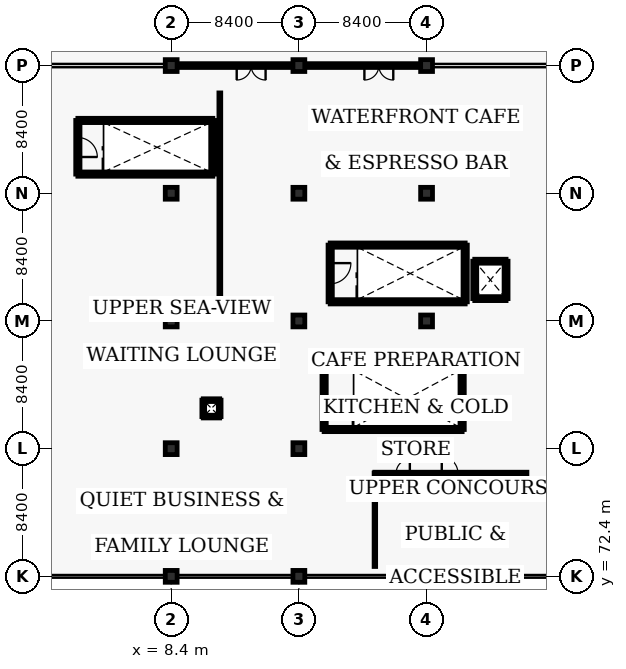
"""IFC4 building model, lengths in metres.
Left out: names, types, materials, properties, quantities, classifications, styles, units other than length and angle.
Written with IfcOpenShell. Run it as: python <this file> out.ifc"""

import sys

from ifc_helpers import new_model, si_unit, direction, frame, frame_2d, origin, origin_2d, place, context, subcontext, project, spatial, rectangle, circle, extrude, element, fill, save


model = new_model("IFC4")
c1 = context("Model", 3, precision=1e-05, world=origin(), true_north=direction((0.0, 1.0)))
c2 = subcontext(c1, "Body", "Model", "MODEL_VIEW")
j1 = project(units=[si_unit("LENGTHUNIT", "METRE"), si_unit("PLANEANGLEUNIT", "RADIAN")], contexts=[c1])
p1 = place(None, origin())
s1 = spatial("IfcSite", under=j1, at=p1, CompositionType="ELEMENT")
p2 = place(p1, origin())
s2 = spatial("IfcBuilding", under=s1, at=p2, CompositionType="ELEMENT")
p3 = place(p2, frame((0.0, 0.0, 9.6)))
s3 = spatial("IfcBuildingStorey", under=s2, at=p3, CompositionType="ELEMENT", Elevation=9.6)
p4 = place(p3, frame((8.4, 72.4, 0.0), z_axis=(0.0, 0.0, 1.0), x_axis=(1.0, 0.0, 0.0)))
e1 = element("IfcColumn", 1, at=p4, inside=s3, PredefinedType="COLUMN", context=c2, shape_type="SweptSolid", body=[
    extrude(circle(Radius=0.39, at=origin_2d()), origin(), (0.0, 0.0, 1.0), 5.565),
])
p5 = place(p3, frame((8.4, 80.8, 0.0), z_axis=(0.0, 0.0, 1.0), x_axis=(1.0, 0.0, 0.0)))
e2 = element("IfcColumn", 2, at=p5, inside=s3, PredefinedType="COLUMN", context=c2, shape_type="SweptSolid", body=[
    extrude(circle(Radius=0.39, at=origin_2d()), origin(), (0.0, 0.0, 1.0), 6.279),
])
p6 = place(p3, frame((8.4, 89.2, 0.0), z_axis=(0.0, 0.0, 1.0), x_axis=(1.0, 0.0, 0.0)))
e3 = element("IfcColumn", 3, at=p6, inside=s3, PredefinedType="COLUMN", context=c2, shape_type="SweptSolid", body=[
    extrude(circle(Radius=0.39, at=origin_2d()), origin(), (0.0, 0.0, 1.0), 6.993),
])
p7 = place(p3, frame((8.4, 97.6, 0.0), z_axis=(0.0, 0.0, 1.0), x_axis=(1.0, 0.0, 0.0)))
e4 = element("IfcColumn", 4, at=p7, inside=s3, PredefinedType="COLUMN", context=c2, shape_type="SweptSolid", body=[
    extrude(circle(Radius=0.39, at=origin_2d()), origin(), (0.0, 0.0, 1.0), 7.708),
])
p8 = place(p3, frame((8.4, 106.0, 0.0), z_axis=(0.0, 0.0, 1.0), x_axis=(1.0, 0.0, 0.0)))
e5 = element("IfcColumn", 5, at=p8, inside=s3, PredefinedType="COLUMN", context=c2, shape_type="SweptSolid", body=[
    extrude(circle(Radius=0.39, at=origin_2d()), origin(), (0.0, 0.0, 1.0), 8.422),
])
p9 = place(p3, frame((16.8, 72.4, 0.0), z_axis=(0.0, 0.0, 1.0), x_axis=(1.0, 0.0, 0.0)))
e6 = element("IfcColumn", 6, at=p9, inside=s3, PredefinedType="COLUMN", context=c2, shape_type="SweptSolid", body=[
    extrude(circle(Radius=0.39, at=origin_2d()), origin(), (0.0, 0.0, 1.0), 8.043),
])
p10 = place(p3, frame((16.8, 80.8, 0.0), z_axis=(0.0, 0.0, 1.0), x_axis=(1.0, 0.0, 0.0)))
e7 = element("IfcColumn", 7, at=p10, inside=s3, PredefinedType="COLUMN", context=c2, shape_type="SweptSolid", body=[
    extrude(circle(Radius=0.39, at=origin_2d()), origin(), (0.0, 0.0, 1.0), 8.757),
])
p11 = place(p3, frame((16.8, 89.2, 0.0), z_axis=(0.0, 0.0, 1.0), x_axis=(1.0, 0.0, 0.0)))
e8 = element("IfcColumn", 8, at=p11, inside=s3, PredefinedType="COLUMN", context=c2, shape_type="SweptSolid", body=[
    extrude(circle(Radius=0.39, at=origin_2d()), origin(), (0.0, 0.0, 1.0), 9.471),
])
p12 = place(p3, frame((16.8, 97.6, 0.0), z_axis=(0.0, 0.0, 1.0), x_axis=(1.0, 0.0, 0.0)))
e9 = element("IfcColumn", 9, at=p12, inside=s3, PredefinedType="COLUMN", context=c2, shape_type="SweptSolid", body=[
    extrude(circle(Radius=0.39, at=origin_2d()), origin(), (0.0, 0.0, 1.0), 10.186),
])
p13 = place(p3, frame((16.8, 106.0, 0.0), z_axis=(0.0, 0.0, 1.0), x_axis=(1.0, 0.0, 0.0)))
e10 = element("IfcColumn", 10, at=p13, inside=s3, PredefinedType="COLUMN", context=c2, shape_type="SweptSolid", body=[
    extrude(circle(Radius=0.39, at=origin_2d()), origin(), (0.0, 0.0, 1.0), 10.9),
])
p14 = place(p3, frame((25.2, 72.4, 0.0), z_axis=(0.0, 0.0, 1.0), x_axis=(1.0, 0.0, 0.0)))
e11 = element("IfcColumn", 11, at=p14, inside=s3, PredefinedType="COLUMN", context=c2, shape_type="SweptSolid", body=[
    extrude(circle(Radius=0.39, at=origin_2d()), origin(), (0.0, 0.0, 1.0), 5.565),
])
p15 = place(p3, frame((25.2, 80.8, 0.0), z_axis=(0.0, 0.0, 1.0), x_axis=(1.0, 0.0, 0.0)))
e12 = element("IfcColumn", 12, at=p15, inside=s3, PredefinedType="COLUMN", context=c2, shape_type="SweptSolid", body=[
    extrude(circle(Radius=0.39, at=origin_2d()), origin(), (0.0, 0.0, 1.0), 6.279),
])
p16 = place(p3, frame((25.2, 89.2, 0.0), z_axis=(0.0, 0.0, 1.0), x_axis=(1.0, 0.0, 0.0)))
e13 = element("IfcColumn", 13, at=p16, inside=s3, PredefinedType="COLUMN", context=c2, shape_type="SweptSolid", body=[
    extrude(circle(Radius=0.39, at=origin_2d()), origin(), (0.0, 0.0, 1.0), 6.993),
])
p17 = place(p3, frame((25.2, 97.6, 0.0), z_axis=(0.0, 0.0, 1.0), x_axis=(1.0, 0.0, 0.0)))
e14 = element("IfcColumn", 14, at=p17, inside=s3, PredefinedType="COLUMN", context=c2, shape_type="SweptSolid", body=[
    extrude(circle(Radius=0.39, at=origin_2d()), origin(), (0.0, 0.0, 1.0), 7.708),
])
p18 = place(p3, frame((25.2, 106.0, 0.0), z_axis=(0.0, 0.0, 1.0), x_axis=(1.0, 0.0, 0.0)))
e15 = element("IfcColumn", 15, at=p18, inside=s3, PredefinedType="COLUMN", context=c2, shape_type="SweptSolid", body=[
    extrude(circle(Radius=0.39, at=origin_2d()), origin(), (0.0, 0.0, 1.0), 8.422),
])
p19 = place(p3, frame((16.41, 106.0, 0.0), z_axis=(0.0, 0.0, 1.0), x_axis=(-1.0, 0.0, 0.0)))
e16 = element("IfcWall", 16, at=p19, inside=s3, PredefinedType="SOLIDWALL", context=c2, shape_type="SweptSolid", body=[
    extrude(rectangle(XDim=7.62, YDim=0.25, at=frame_2d((3.81, 0.0))), origin(), (0.0, 0.0, 1.0), 5.243),
])
p20 = place(p19, frame((1.8, 0.0, 0.0)))
e17 = element("IfcOpeningElement", 17, at=p20, cuts=e16, PredefinedType="OPENING", context=c2, shape_type="SweptSolid", body=[
    extrude(rectangle(XDim=1.9, YDim=2.15, at=frame_2d((0.95, 1.075))), frame((0.0, 0.135, 0.0), z_axis=(0.0, -1.0, 0.0), x_axis=(1.0, 0.0, 0.0)), (0.0, 0.0, 1.0), 0.27),
])
p21 = place(p19, frame((4.45, 0.0, 0.9)))
e18 = element("IfcOpeningElement", 18, at=p21, cuts=e16, PredefinedType="OPENING", context=c2, shape_type="SweptSolid", body=[
    extrude(rectangle(XDim=2.1, YDim=1.6, at=frame_2d((1.05, 0.8))), frame((0.0, 0.135, 0.0), z_axis=(0.0, -1.0, 0.0), x_axis=(1.0, 0.0, 0.0)), (0.0, 0.0, 1.0), 0.27),
])
p22 = place(p3, frame((24.81, 106.0, 0.0), z_axis=(0.0, 0.0, 1.0), x_axis=(-1.0, 0.0, 0.0)))
e19 = element("IfcWall", 19, at=p22, inside=s3, PredefinedType="SOLIDWALL", context=c2, shape_type="SweptSolid", body=[
    extrude(rectangle(XDim=7.62, YDim=0.25, at=frame_2d((3.81, 0.0))), origin(), (0.0, 0.0, 1.0), 5.243),
])
p23 = place(p22, frame((1.8, 0.0, 0.0)))
e20 = element("IfcOpeningElement", 20, at=p23, cuts=e19, PredefinedType="OPENING", context=c2, shape_type="SweptSolid", body=[
    extrude(rectangle(XDim=1.9, YDim=2.15, at=frame_2d((0.95, 1.075))), frame((0.0, 0.135, 0.0), z_axis=(0.0, -1.0, 0.0), x_axis=(1.0, 0.0, 0.0)), (0.0, 0.0, 1.0), 0.27),
])
p24 = place(p22, frame((4.45, 0.0, 0.9)))
e21 = element("IfcOpeningElement", 21, at=p24, cuts=e19, PredefinedType="OPENING", context=c2, shape_type="SweptSolid", body=[
    extrude(rectangle(XDim=1.7, YDim=1.6, at=frame_2d((0.85, 0.8))), frame((0.0, 0.135, 0.0), z_axis=(0.0, -1.0, 0.0), x_axis=(1.0, 0.0, 0.0)), (0.0, 0.0, 1.0), 0.27),
])
for number, where, z_axis, x_axis in (
    (22, (18.86, 90.46, 0.0), (0.0, 0.0, 1.0), (1.0, 0.0, 0.0)),
    (23, (18.86, 94.19, 0.0), (0.0, 0.0, 1.0), (1.0, 0.0, 0.0)),
):
    element("IfcWall", number, at=place(p3, frame(where, z_axis=z_axis, x_axis=x_axis)), inside=s3, PredefinedType="SHEAR", context=c2, shape_type="SweptSolid", body=[
        extrude(rectangle(XDim=8.88, YDim=0.28, at=frame_2d((4.44, 0.0))), origin(), (0.0, 0.0, 1.0), 2.75),
    ])
p25 = place(p3, frame((18.86, 94.19, 0.0), z_axis=(0.0, 0.0, 1.0), x_axis=(0.0, -1.0, 0.0)))
e24 = element("IfcWall", 24, at=p25, inside=s3, PredefinedType="SHEAR", context=c2, shape_type="SweptSolid", body=[
    extrude(rectangle(XDim=3.73, YDim=0.28, at=frame_2d((1.865, 0.0))), origin(), (0.0, 0.0, 1.0), 2.75),
])
p26 = place(p25, frame((1.185, 0.0, 0.0)))
e25 = element("IfcOpeningElement", 25, at=p26, cuts=e24, PredefinedType="OPENING", context=c2, shape_type="SweptSolid", body=[
    extrude(rectangle(XDim=1.36, YDim=2.15, at=frame_2d((0.68, 1.075))), frame((0.0, 0.15, 0.0), z_axis=(0.0, -1.0, 0.0), x_axis=(1.0, 0.0, 0.0)), (0.0, 0.0, 1.0), 0.3),
])
p27 = place(p3, frame((27.74, 90.46, 0.0), z_axis=(0.0, 0.0, 1.0), x_axis=(0.0, 1.0, 0.0)))
e26 = element("IfcWall", 26, at=p27, inside=s3, PredefinedType="SHEAR", context=c2, shape_type="SweptSolid", body=[
    extrude(rectangle(XDim=3.73, YDim=0.28, at=frame_2d((1.865, 0.0))), origin(), (0.0, 0.0, 1.0), 2.75),
])
p28 = place(p3, frame((28.37, 90.67, 0.0), z_axis=(0.0, 0.0, 1.0), x_axis=(1.0, 0.0, 0.0)))
e27 = element("IfcWall", 27, at=p28, inside=s3, PredefinedType="SHEAR", context=c2, shape_type="SweptSolid", body=[
    extrude(rectangle(XDim=2.06, YDim=0.26, at=frame_2d((1.03, 0.0))), origin(), (0.0, 0.0, 1.0), 2.75),
])
for number, where, z_axis, x_axis in (
    (28, (30.43, 90.67, 0.0), (0.0, 0.0, 1.0), (0.0, 1.0, 0.0)),
    (29, (28.37, 93.13, 0.0), (0.0, 0.0, 1.0), (0.0, -1.0, 0.0)),
):
    element("IfcWall", number, at=place(p3, frame(where, z_axis=z_axis, x_axis=x_axis)), inside=s3, PredefinedType="SHEAR", context=c2, shape_type="SweptSolid", body=[
        extrude(rectangle(XDim=2.46, YDim=0.26, at=frame_2d((1.23, 0.0))), origin(), (0.0, 0.0, 1.0), 2.75),
    ])
p29 = place(p3, frame((28.37, 93.13, 0.0), z_axis=(0.0, 0.0, 1.0), x_axis=(1.0, 0.0, 0.0)))
e30 = element("IfcWall", 30, at=p29, inside=s3, PredefinedType="SHEAR", context=c2, shape_type="SweptSolid", body=[
    extrude(rectangle(XDim=2.06, YDim=0.26, at=frame_2d((1.03, 0.0))), origin(), (0.0, 0.0, 1.0), 2.75),
])
p30 = place(p29, frame((0.46, 0.0, 0.0)))
e31 = element("IfcOpeningElement", 31, at=p30, cuts=e30, PredefinedType="OPENING", context=c2, shape_type="SweptSolid", body=[
    extrude(rectangle(XDim=1.14, YDim=2.14, at=frame_2d((0.57, 1.07))), frame((0.0, 0.14, 0.0), z_axis=(0.0, -1.0, 0.0), x_axis=(1.0, 0.0, 0.0)), (0.0, 0.0, 1.0), 0.28),
])
for number, where, z_axis, x_axis in (
    (32, (2.26, 98.86, 0.0), (0.0, 0.0, 1.0), (1.0, 0.0, 0.0)),
    (33, (2.26, 102.39, 0.0), (0.0, 0.0, 1.0), (1.0, 0.0, 0.0)),
):
    element("IfcWall", number, at=place(p3, frame(where, z_axis=z_axis, x_axis=x_axis)), inside=s3, PredefinedType="SHEAR", context=c2, shape_type="SweptSolid", body=[
        extrude(rectangle(XDim=8.88, YDim=0.28, at=frame_2d((4.44, 0.0))), origin(), (0.0, 0.0, 1.0), 2.75),
    ])
p31 = place(p3, frame((2.26, 102.39, 0.0), z_axis=(0.0, 0.0, 1.0), x_axis=(0.0, -1.0, 0.0)))
e34 = element("IfcWall", 34, at=p31, inside=s3, PredefinedType="SHEAR", context=c2, shape_type="SweptSolid", body=[
    extrude(rectangle(XDim=3.53, YDim=0.28, at=frame_2d((1.765, 0.0))), origin(), (0.0, 0.0, 1.0), 2.75),
])
p32 = place(p31, frame((1.125, 0.0, 0.0)))
e35 = element("IfcOpeningElement", 35, at=p32, cuts=e34, PredefinedType="OPENING", context=c2, shape_type="SweptSolid", body=[
    extrude(rectangle(XDim=1.28, YDim=2.1, at=frame_2d((0.64, 1.05))), frame((0.0, 0.15, 0.0), z_axis=(0.0, -1.0, 0.0), x_axis=(1.0, 0.0, 0.0)), (0.0, 0.0, 1.0), 0.3),
])
p33 = place(p3, frame((11.14, 98.86, 0.0), z_axis=(0.0, 0.0, 1.0), x_axis=(0.0, 1.0, 0.0)))
e36 = element("IfcWall", 36, at=p33, inside=s3, PredefinedType="SHEAR", context=c2, shape_type="SweptSolid", body=[
    extrude(rectangle(XDim=3.53, YDim=0.28, at=frame_2d((1.765, 0.0))), origin(), (0.0, 0.0, 1.0), 2.75),
])
for number, where, z_axis, x_axis in (
    (37, (18.46, 82.06, 0.0), (0.0, 0.0, 1.0), (1.0, 0.0, 0.0)),
    (38, (18.46, 86.09, 0.0), (0.0, 0.0, 1.0), (1.0, 0.0, 0.0)),
):
    element("IfcWall", number, at=place(p3, frame(where, z_axis=z_axis, x_axis=x_axis)), inside=s3, PredefinedType="SHEAR", context=c2, shape_type="SweptSolid", body=[
        extrude(rectangle(XDim=9.08, YDim=0.28, at=frame_2d((4.54, 0.0))), origin(), (0.0, 0.0, 1.0), 2.75),
    ])
p34 = place(p3, frame((18.46, 86.09, 0.0), z_axis=(0.0, 0.0, 1.0), x_axis=(0.0, -1.0, 0.0)))
e39 = element("IfcWall", 39, at=p34, inside=s3, PredefinedType="SHEAR", context=c2, shape_type="SweptSolid", body=[
    extrude(rectangle(XDim=4.03, YDim=0.28, at=frame_2d((2.015, 0.0))), origin(), (0.0, 0.0, 1.0), 2.75),
])
p35 = place(p34, frame((1.035, 0.0, 0.0)))
e40 = element("IfcOpeningElement", 40, at=p35, cuts=e39, PredefinedType="OPENING", context=c2, shape_type="SweptSolid", body=[
    extrude(rectangle(XDim=1.96, YDim=2.22, at=frame_2d((0.98, 1.11))), frame((0.0, 0.15, 0.0), z_axis=(0.0, -1.0, 0.0), x_axis=(1.0, 0.0, 0.0)), (0.0, 0.0, 1.0), 0.3),
])
p36 = place(p3, frame((27.54, 82.06, 0.0), z_axis=(0.0, 0.0, 1.0), x_axis=(0.0, 1.0, 0.0)))
e41 = element("IfcWall", 41, at=p36, inside=s3, PredefinedType="SHEAR", context=c2, shape_type="SweptSolid", body=[
    extrude(rectangle(XDim=4.03, YDim=0.28, at=frame_2d((2.015, 0.0))), origin(), (0.0, 0.0, 1.0), 2.75),
])
for number, where, z_axis, x_axis in (
    (42, (10.51, 82.91, 0.0), (0.0, 0.0, 1.0), (1.0, 0.0, 0.0)),
    (43, (11.59, 82.91, 0.0), (0.0, 0.0, 1.0), (0.0, 1.0, 0.0)),
    (44, (11.59, 83.99, 0.0), (0.0, 0.0, 1.0), (-1.0, 0.0, 0.0)),
    (45, (10.51, 83.99, 0.0), (0.0, 0.0, 1.0), (0.0, -1.0, 0.0)),
):
    element("IfcWall", number, at=place(p3, frame(where, z_axis=z_axis, x_axis=x_axis)), inside=s3, PredefinedType="SOLIDWALL", context=c2, shape_type="SweptSolid", body=[
        extrude(rectangle(XDim=1.08, YDim=0.18, at=frame_2d((0.54, 0.0))), origin(), (0.0, 0.0, 1.0), 2.6),
    ])
p37 = place(p3, frame((11.6, 90.7, 0.0), z_axis=(0.0, 0.0, 1.0), x_axis=(0.0, 1.0, 0.0)))
e46 = element("IfcWall", 46, at=p37, inside=s3, PredefinedType="PARTITIONING", context=c2, shape_type="SweptSolid", body=[
    extrude(rectangle(XDim=13.5, YDim=0.12, at=frame_2d((6.75, 0.0))), origin(), (0.0, 0.0, 1.0), 2.45),
])
p38 = place(p37, frame((2.4, 0.0, 0.0)))
e47 = element("IfcOpeningElement", 47, at=p38, cuts=e46, PredefinedType="OPENING", context=c2, shape_type="SweptSolid", body=[
    extrude(rectangle(XDim=2.1, YDim=2.22, at=frame_2d((1.05, 1.11))), frame((0.0, 0.07, 0.0), z_axis=(0.0, -1.0, 0.0), x_axis=(1.0, 0.0, 0.0)), (0.0, 0.0, 1.0), 0.14),
])
p39 = place(p3, frame((21.8, 79.2, 0.0), z_axis=(0.0, 0.0, 1.0), x_axis=(1.0, 0.0, 0.0)))
e48 = element("IfcWall", 48, at=p39, inside=s3, PredefinedType="PARTITIONING", context=c2, shape_type="SweptSolid", body=[
    extrude(rectangle(XDim=10.0, YDim=0.1, at=frame_2d((5.0, 0.0))), origin(), (0.0, 0.0, 1.0), 2.45),
])
p40 = place(p39, frame((1.4, 0.0, 0.0)))
e49 = element("IfcOpeningElement", 49, at=p40, cuts=e48, PredefinedType="OPENING", context=c2, shape_type="SweptSolid", body=[
    extrude(rectangle(XDim=0.9, YDim=2.06, at=frame_2d((0.45, 1.03))), frame((0.0, 0.06, 0.0), z_axis=(0.0, -1.0, 0.0), x_axis=(1.0, 0.0, 0.0)), (0.0, 0.0, 1.0), 0.12),
])
p41 = place(p39, frame((4.4, 0.0, 0.0)))
e50 = element("IfcOpeningElement", 50, at=p41, cuts=e48, PredefinedType="OPENING", context=c2, shape_type="SweptSolid", body=[
    extrude(rectangle(XDim=1.06, YDim=2.1, at=frame_2d((0.53, 1.05))), frame((0.0, 0.06, 0.0), z_axis=(0.0, -1.0, 0.0), x_axis=(1.0, 0.0, 0.0)), (0.0, 0.0, 1.0), 0.12),
])
p42 = place(p3, frame((21.8, 73.05, 0.0), z_axis=(0.0, 0.0, 1.0), x_axis=(0.0, 1.0, 0.0)))
e51 = element("IfcWall", 51, at=p42, inside=s3, PredefinedType="PARTITIONING", context=c2, shape_type="SweptSolid", body=[
    extrude(rectangle(XDim=6.15, YDim=0.1, at=frame_2d((3.075, 0.0))), origin(), (0.0, 0.0, 1.0), 2.65),
])
p43 = place(p20, origin())
e52 = element("IfcDoor", 52, at=p43, inside=s3, OperationType="DOUBLE_DOOR_SINGLE_SWING", PredefinedType="DOOR", context=c2, shape_type="SweptSolid", body=[
    extrude(rectangle(XDim=1.9, YDim=2.15, at=frame_2d((0.95, 1.075))), frame((0.0, 0.025, 0.0), z_axis=(0.0, -1.0, 0.0), x_axis=(1.0, 0.0, 0.0)), (0.0, 0.0, 1.0), 0.05),
])
fill(e17, e52)
p44 = place(p21, origin())
e53 = element("IfcWindow", 53, at=p44, inside=s3, PartitioningType="DOUBLE_PANEL_VERTICAL", PredefinedType="WINDOW", context=c2, shape_type="SweptSolid", body=[
    extrude(rectangle(XDim=2.1, YDim=1.6, at=frame_2d((1.05, 0.8))), frame((0.0, 0.03, 0.0), z_axis=(0.0, -1.0, 0.0), x_axis=(1.0, 0.0, 0.0)), (0.0, 0.0, 1.0), 0.06),
])
fill(e18, e53)
p45 = place(p23, origin())
e54 = element("IfcDoor", 54, at=p45, inside=s3, OperationType="DOUBLE_DOOR_SINGLE_SWING", PredefinedType="DOOR", context=c2, shape_type="SweptSolid", body=[
    extrude(rectangle(XDim=1.9, YDim=2.15, at=frame_2d((0.95, 1.075))), frame((0.0, 0.025, 0.0), z_axis=(0.0, -1.0, 0.0), x_axis=(1.0, 0.0, 0.0)), (0.0, 0.0, 1.0), 0.05),
])
fill(e20, e54)
p46 = place(p24, origin())
e55 = element("IfcWindow", 55, at=p46, inside=s3, PartitioningType="DOUBLE_PANEL_VERTICAL", PredefinedType="WINDOW", context=c2, shape_type="SweptSolid", body=[
    extrude(rectangle(XDim=1.7, YDim=1.6, at=frame_2d((0.85, 0.8))), frame((0.0, 0.03, 0.0), z_axis=(0.0, -1.0, 0.0), x_axis=(1.0, 0.0, 0.0)), (0.0, 0.0, 1.0), 0.06),
])
fill(e21, e55)
p47 = place(p26, origin())
e56 = element("IfcDoor", 56, at=p47, inside=s3, OperationType="SINGLE_SWING_LEFT", PredefinedType="DOOR", context=c2, shape_type="SweptSolid", body=[
    extrude(rectangle(XDim=1.36, YDim=2.15, at=frame_2d((0.68, 1.075))), frame((0.0, 0.025, 0.0), z_axis=(0.0, -1.0, 0.0), x_axis=(1.0, 0.0, 0.0)), (0.0, 0.0, 1.0), 0.05),
])
fill(e25, e56)
p48 = place(p30, origin())
e57 = element("IfcDoor", 57, at=p48, inside=s3, OperationType="DOUBLE_DOOR_SLIDING", PredefinedType="DOOR", context=c2, shape_type="SweptSolid", body=[
    extrude(rectangle(XDim=1.14, YDim=2.14, at=frame_2d((0.57, 1.07))), frame((0.0, 0.025, 0.0), z_axis=(0.0, -1.0, 0.0), x_axis=(1.0, 0.0, 0.0)), (0.0, 0.0, 1.0), 0.05),
])
fill(e31, e57)
p49 = place(p32, origin())
e58 = element("IfcDoor", 58, at=p49, inside=s3, OperationType="SINGLE_SWING_RIGHT", PredefinedType="DOOR", context=c2, shape_type="SweptSolid", body=[
    extrude(rectangle(XDim=1.28, YDim=2.1, at=frame_2d((0.64, 1.05))), frame((0.0, 0.025, 0.0), z_axis=(0.0, -1.0, 0.0), x_axis=(1.0, 0.0, 0.0)), (0.0, 0.0, 1.0), 0.05),
])
fill(e35, e58)
p50 = place(p35, origin())
e59 = element("IfcDoor", 59, at=p50, inside=s3, OperationType="DOUBLE_DOOR_SLIDING", PredefinedType="DOOR", context=c2, shape_type="SweptSolid", body=[
    extrude(rectangle(XDim=1.96, YDim=2.22, at=frame_2d((0.98, 1.11))), frame((0.0, 0.025, 0.0), z_axis=(0.0, -1.0, 0.0), x_axis=(1.0, 0.0, 0.0)), (0.0, 0.0, 1.0), 0.05),
])
fill(e40, e59)
p51 = place(p38, origin())
e60 = element("IfcDoor", 60, at=p51, inside=s3, OperationType="DOUBLE_DOOR_SLIDING", PredefinedType="DOOR", context=c2, shape_type="SweptSolid", body=[
    extrude(rectangle(XDim=2.1, YDim=2.22, at=frame_2d((1.05, 1.11))), frame((0.0, 0.025, 0.0), z_axis=(0.0, -1.0, 0.0), x_axis=(1.0, 0.0, 0.0)), (0.0, 0.0, 1.0), 0.05),
])
fill(e47, e60)
p52 = place(p40, origin())
e61 = element("IfcDoor", 61, at=p52, inside=s3, OperationType="SINGLE_SWING_RIGHT", PredefinedType="DOOR", context=c2, shape_type="SweptSolid", body=[
    extrude(rectangle(XDim=0.9, YDim=2.06, at=frame_2d((0.45, 1.03))), frame((0.0, 0.025, 0.0), z_axis=(0.0, -1.0, 0.0), x_axis=(1.0, 0.0, 0.0)), (0.0, 0.0, 1.0), 0.05),
])
fill(e49, e61)
p53 = place(p41, origin())
e62 = element("IfcDoor", 62, at=p53, inside=s3, OperationType="SINGLE_SWING_LEFT", PredefinedType="DOOR", context=c2, shape_type="SweptSolid", body=[
    extrude(rectangle(XDim=1.06, YDim=2.1, at=frame_2d((0.53, 1.05))), frame((0.0, 0.025, 0.0), z_axis=(0.0, -1.0, 0.0), x_axis=(1.0, 0.0, 0.0)), (0.0, 0.0, 1.0), 0.05),
])
fill(e50, e62)
save(model, sys.argv[1])
